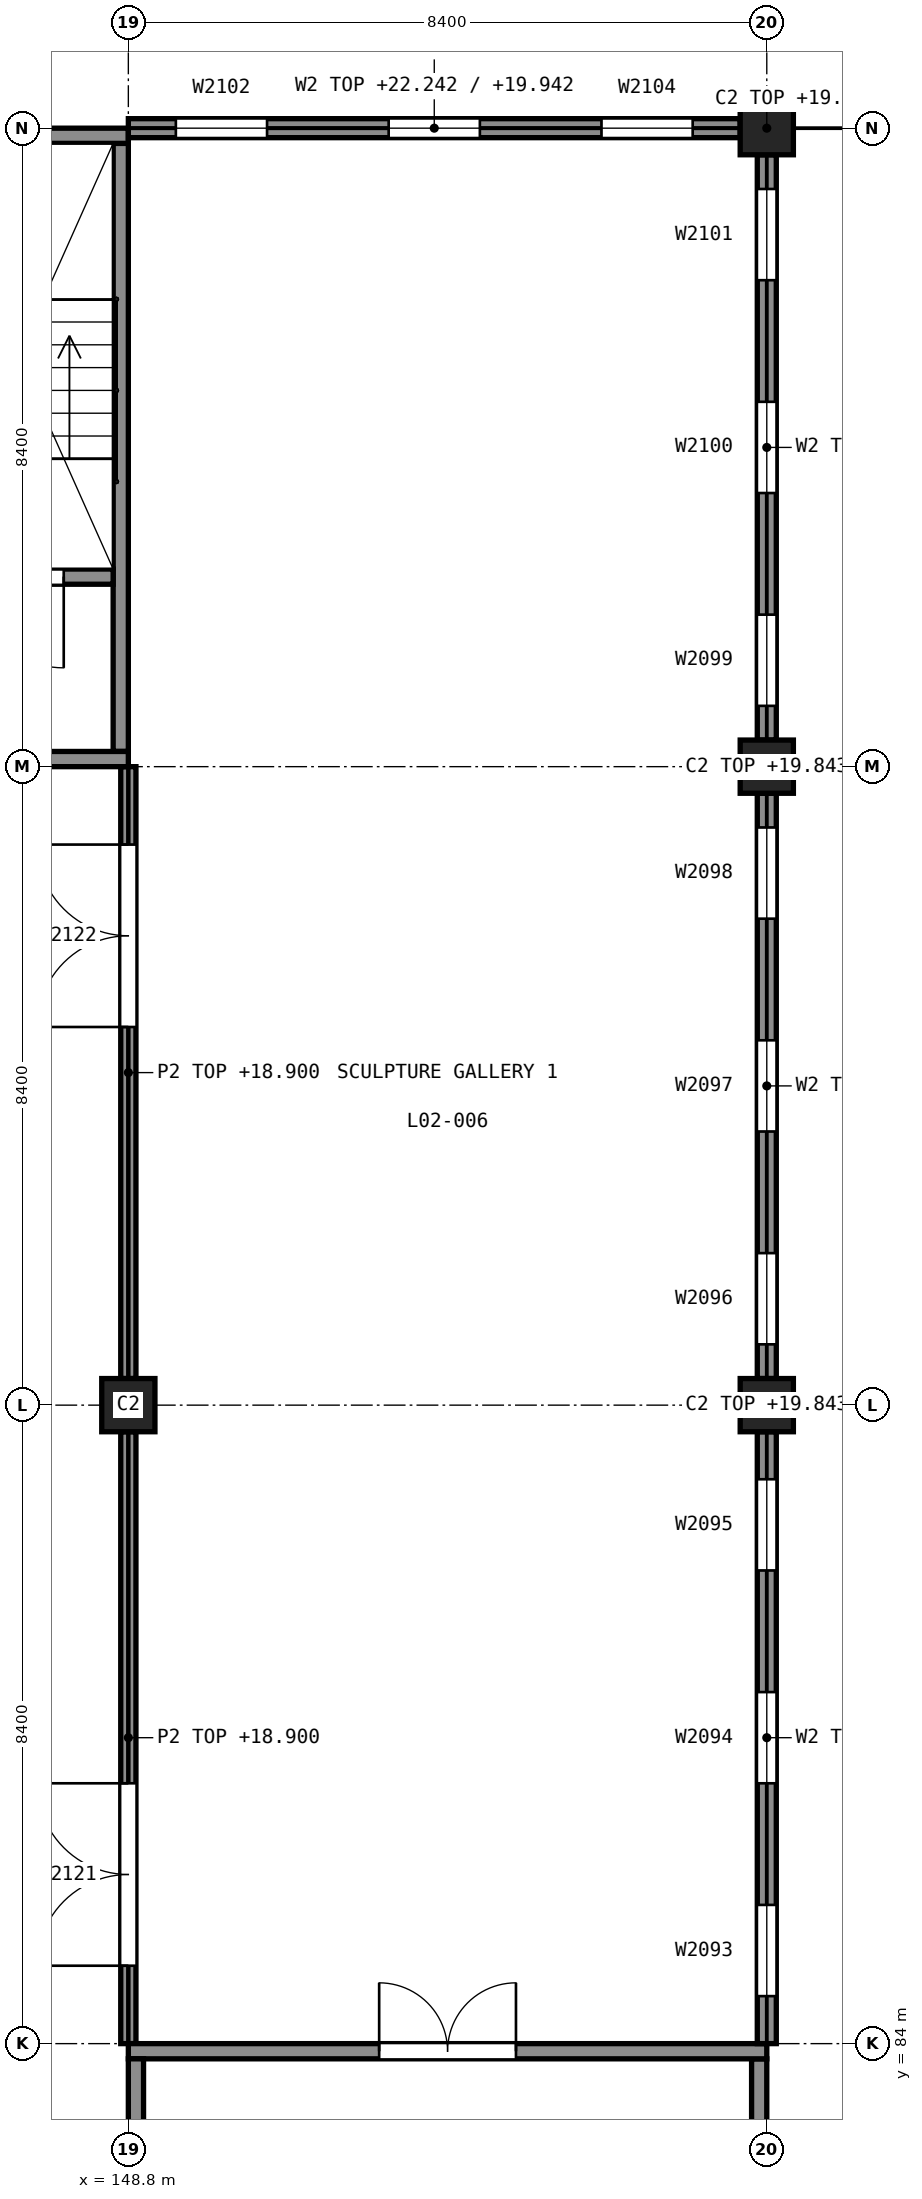
"""IFC4 building model, lengths in metres.
Left out: names, types, materials, properties, quantities, classifications, styles, units other than length and angle.
Written with IfcOpenShell. Run it as: python <this file> out.ifc"""

import sys

from ifc_helpers import new_model, si_unit, direction, frame, frame_2d, origin, origin_2d, place, context, subcontext, project, spatial, polyline, rectangle, outline, extrude, element, fill, save


model = new_model("IFC4")
c1 = context("Model", 3, precision=1e-05, world=origin(), true_north=direction((0.0, 1.0)))
c2 = subcontext(c1, "Body", "Model", "MODEL_VIEW")
j1 = project(units=[si_unit("LENGTHUNIT", "METRE"), si_unit("PLANEANGLEUNIT", "RADIAN")], contexts=[c1])
p1 = place(None, origin())
s1 = spatial("IfcSite", under=j1, at=p1, CompositionType="ELEMENT")
p2 = place(p1, origin())
s2 = spatial("IfcBuilding", under=s1, at=p2, CompositionType="ELEMENT")
p3 = place(p2, frame((0.0, 0.0, 10.5)))
s3 = spatial("IfcBuildingStorey", under=s2, at=p3, CompositionType="ELEMENT", Elevation=10.5)
p4 = place(p3, frame((140.4, 100.9, 0.0), z_axis=(0.0, 0.0, 1.0), x_axis=(1.0, 0.0, 0.0)))
e1 = element("IfcWall", 1, at=p4, inside=s3, PredefinedType="SHEAR", context=c2, shape_type="SweptSolid", body=[
    extrude(rectangle(XDim=8.4, YDim=0.2, at=frame_2d((4.2, 0.0))), origin(), (0.0, 0.0, 1.0), 9.5),
])
p5 = place(p4, frame((3.3, 0.0, 0.0)))
e2 = element("IfcOpeningElement", 2, at=p5, cuts=e1, PredefinedType="OPENING", context=c2, shape_type="SweptSolid", body=[
    extrude(rectangle(XDim=1.8, YDim=2.1, at=frame_2d((0.9, 1.05))), frame((0.0, 0.11, 0.0), z_axis=(0.0, -1.0, 0.0), x_axis=(1.0, 0.0, 0.0)), (0.0, 0.0, 1.0), 0.22),
])
p6 = place(p3, frame((140.4, 109.1, 0.0), z_axis=(0.0, 0.0, 1.0), x_axis=(1.0, 0.0, 0.0)))
e3 = element("IfcWall", 3, at=p6, inside=s3, PredefinedType="SHEAR", context=c2, shape_type="SweptSolid", body=[
    extrude(rectangle(XDim=8.4, YDim=0.2, at=frame_2d((4.2, 0.0))), origin(), (0.0, 0.0, 1.0), 9.5),
])
p7 = place(p3, frame((148.7, 101.0, 0.0), z_axis=(0.0, 0.0, 1.0), x_axis=(0.0, 1.0, 0.0)))
e4 = element("IfcWall", 4, at=p7, inside=s3, PredefinedType="SHEAR", context=c2, shape_type="SweptSolid", body=[
    extrude(rectangle(XDim=8.0, YDim=0.2, at=frame_2d((4.0, 0.0))), origin(), (0.0, 0.0, 1.0), 9.5),
])
p8 = place(p3, frame((140.6, 103.3, 0.0), z_axis=(0.0, 0.0, 1.0), x_axis=(1.0, 0.0, 0.0)))
e5 = element("IfcWall", 5, at=p8, inside=s3, PredefinedType="SHEAR", context=c2, shape_type="SweptSolid", body=[
    extrude(rectangle(XDim=8.0, YDim=0.2, at=frame_2d((4.0, 0.0))), origin(), (0.0, 0.0, 1.0), 9.5),
])
p9 = place(p8, frame((0.65, 0.0, 0.0)))
e6 = element("IfcOpeningElement", 6, at=p9, cuts=e5, PredefinedType="OPENING", context=c2, shape_type="SweptSolid", body=[
    extrude(rectangle(XDim=1.2, YDim=2.1, at=frame_2d((0.6, 1.05))), frame((0.0, 0.11, 0.0), z_axis=(0.0, -1.0, 0.0), x_axis=(1.0, 0.0, 0.0)), (0.0, 0.0, 1.0), 0.22),
])
p10 = place(p8, frame((6.15, 0.0, 0.0)))
e7 = element("IfcOpeningElement", 7, at=p10, cuts=e5, PredefinedType="OPENING", context=c2, shape_type="SweptSolid", body=[
    extrude(rectangle(XDim=1.2, YDim=2.1, at=frame_2d((0.6, 1.05))), frame((0.0, 0.11, 0.0), z_axis=(0.0, -1.0, 0.0), x_axis=(1.0, 0.0, 0.0)), (0.0, 0.0, 1.0), 0.22),
])
p11 = place(p3, frame((148.8, 83.9, 0.0), z_axis=(0.0, 0.0, 1.0), x_axis=(1.0, 0.0, 0.0)))
e8 = element("IfcWall", 8, at=p11, inside=s3, PredefinedType="SHEAR", context=c2, shape_type="SweptSolid", body=[
    extrude(outline(polyline([(0.0, 0.0), (8.4, 0.0), (8.4, 9.4), (8.1, 9.486), (7.8, 9.571), (6.9, 9.829), (6.6, 9.914), (6.0, 10.086), (5.7, 10.171), (4.8, 10.429), (4.5, 10.514), (3.9, 10.686), (3.6, 10.771), (2.7, 11.029), (2.4, 11.114), (1.8, 11.286), (1.5, 11.371), (0.6, 11.629), (0.3, 11.714), (0.0, 11.8), (0.0, 0.0)])), frame((0.0, 0.1, 0.0), z_axis=(0.0, -1.0, 0.0), x_axis=(1.0, 0.0, 0.0)), (0.0, 0.0, 1.0), 0.2),
])
p12 = place(p11, frame((3.3, 0.0, 0.0)))
e9 = element("IfcOpeningElement", 9, at=p12, cuts=e8, PredefinedType="OPENING", context=c2, shape_type="SweptSolid", body=[
    extrude(rectangle(XDim=1.8, YDim=2.1, at=frame_2d((0.9, 1.05))), frame((0.0, 0.11, 0.0), z_axis=(0.0, -1.0, 0.0), x_axis=(1.0, 0.0, 0.0)), (0.0, 0.0, 1.0), 0.22),
])
p13 = place(p3, frame((148.9, 75.8, 0.0), z_axis=(0.0, 0.0, 1.0), x_axis=(0.0, 1.0, 0.0)))
e10 = element("IfcWall", 10, at=p13, inside=s3, PredefinedType="SHEAR", context=c2, shape_type="SweptSolid", body=[
    extrude(rectangle(XDim=8.0, YDim=0.2, at=frame_2d((4.0, 0.0))), origin(), (0.0, 0.0, 1.0), 11.8),
])
p14 = place(p3, frame((157.1, 75.8, 0.0), z_axis=(0.0, 0.0, 1.0), x_axis=(0.0, 1.0, 0.0)))
e11 = element("IfcWall", 11, at=p14, inside=s3, PredefinedType="SHEAR", context=c2, shape_type="SweptSolid", body=[
    extrude(rectangle(XDim=8.0, YDim=0.2, at=frame_2d((4.0, 0.0))), origin(), (0.0, 0.0, 1.0), 9.43),
])
p15 = place(p3, frame((148.8, 92.4, 0.0), z_axis=(0.0, 0.0, 1.0), x_axis=(1.0, 0.0, 0.0)))
e12 = element("IfcColumn", 12, at=p15, inside=s3, PredefinedType="COLUMN", context=c2, shape_type="SweptSolid", body=[
    extrude(rectangle(XDim=0.7, YDim=0.7, at=origin_2d()), origin(), (0.0, 0.0, 1.0), 9.5),
])
for number, where, z_axis, x_axis in (
    (13, (157.2, 92.4, 0.0), (0.0, 0.0, 1.0), (1.0, 0.0, 0.0)),
    (14, (157.2, 100.8, 0.0), (0.0, 0.0, 1.0), (1.0, 0.0, 0.0)),
    (15, (157.2, 109.2, 0.0), (0.0, 0.0, 1.0), (1.0, 0.0, 0.0)),
):
    element("IfcColumn", number, at=place(p3, frame(where, z_axis=z_axis, x_axis=x_axis)), inside=s3, PredefinedType="COLUMN", context=c2, shape_type="SweptSolid", body=[
        extrude(rectangle(XDim=0.7, YDim=0.7, at=origin_2d()), origin(), (0.0, 0.0, 1.0), 9.343),
    ])
p16 = place(p3, frame((157.2, 84.0, 0.0), z_axis=(0.0, 0.0, 1.0), x_axis=(0.0, 1.0, 0.0)))
e16 = element("IfcWall", 16, at=p16, inside=s3, PredefinedType="SOLIDWALL", context=c2, shape_type="SweptSolid", body=[
    extrude(rectangle(XDim=8.05, YDim=0.25, at=frame_2d((4.025, 0.0))), origin(), (0.0, 0.0, 1.0), 9.342),
])
p17 = place(p16, frame((0.625, 0.0, 0.9)))
e17 = element("IfcOpeningElement", 17, at=p17, cuts=e16, PredefinedType="OPENING", context=c2, shape_type="SweptSolid", body=[
    extrude(rectangle(XDim=1.2, YDim=6.0, at=frame_2d((0.6, 3.0))), frame((0.0, 0.135, 0.0), z_axis=(0.0, -1.0, 0.0), x_axis=(1.0, 0.0, 0.0)), (0.0, 0.0, 1.0), 0.27),
])
p18 = place(p16, frame((3.425, 0.0, 0.9)))
e18 = element("IfcOpeningElement", 18, at=p18, cuts=e16, PredefinedType="OPENING", context=c2, shape_type="SweptSolid", body=[
    extrude(rectangle(XDim=1.2, YDim=6.0, at=frame_2d((0.6, 3.0))), frame((0.0, 0.135, 0.0), z_axis=(0.0, -1.0, 0.0), x_axis=(1.0, 0.0, 0.0)), (0.0, 0.0, 1.0), 0.27),
])
p19 = place(p16, frame((6.225, 0.0, 0.9)))
e19 = element("IfcOpeningElement", 19, at=p19, cuts=e16, PredefinedType="OPENING", context=c2, shape_type="SweptSolid", body=[
    extrude(rectangle(XDim=1.2, YDim=6.0, at=frame_2d((0.6, 3.0))), frame((0.0, 0.135, 0.0), z_axis=(0.0, -1.0, 0.0), x_axis=(1.0, 0.0, 0.0)), (0.0, 0.0, 1.0), 0.27),
])
p20 = place(p3, frame((157.2, 92.75, 0.0), z_axis=(0.0, 0.0, 1.0), x_axis=(0.0, 1.0, 0.0)))
e20 = element("IfcWall", 20, at=p20, inside=s3, PredefinedType="SOLIDWALL", context=c2, shape_type="SweptSolid", body=[
    extrude(rectangle(XDim=7.7, YDim=0.25, at=frame_2d((3.85, 0.0))), origin(), (0.0, 0.0, 1.0), 9.342),
])
p21 = place(p20, frame((0.45, 0.0, 0.9)))
e21 = element("IfcOpeningElement", 21, at=p21, cuts=e20, PredefinedType="OPENING", context=c2, shape_type="SweptSolid", body=[
    extrude(rectangle(XDim=1.2, YDim=6.0, at=frame_2d((0.6, 3.0))), frame((0.0, 0.135, 0.0), z_axis=(0.0, -1.0, 0.0), x_axis=(1.0, 0.0, 0.0)), (0.0, 0.0, 1.0), 0.27),
])
p22 = place(p20, frame((3.25, 0.0, 0.9)))
e22 = element("IfcOpeningElement", 22, at=p22, cuts=e20, PredefinedType="OPENING", context=c2, shape_type="SweptSolid", body=[
    extrude(rectangle(XDim=1.2, YDim=6.0, at=frame_2d((0.6, 3.0))), frame((0.0, 0.135, 0.0), z_axis=(0.0, -1.0, 0.0), x_axis=(1.0, 0.0, 0.0)), (0.0, 0.0, 1.0), 0.27),
])
p23 = place(p20, frame((6.05, 0.0, 0.9)))
e23 = element("IfcOpeningElement", 23, at=p23, cuts=e20, PredefinedType="OPENING", context=c2, shape_type="SweptSolid", body=[
    extrude(rectangle(XDim=1.2, YDim=6.0, at=frame_2d((0.6, 3.0))), frame((0.0, 0.135, 0.0), z_axis=(0.0, -1.0, 0.0), x_axis=(1.0, 0.0, 0.0)), (0.0, 0.0, 1.0), 0.27),
])
p24 = place(p3, frame((157.2, 101.15, 0.0), z_axis=(0.0, 0.0, 1.0), x_axis=(0.0, 1.0, 0.0)))
e24 = element("IfcWall", 24, at=p24, inside=s3, PredefinedType="SOLIDWALL", context=c2, shape_type="SweptSolid", body=[
    extrude(rectangle(XDim=7.7, YDim=0.25, at=frame_2d((3.85, 0.0))), origin(), (0.0, 0.0, 1.0), 9.342),
])
p25 = place(p24, frame((0.45, 0.0, 0.9)))
e25 = element("IfcOpeningElement", 25, at=p25, cuts=e24, PredefinedType="OPENING", context=c2, shape_type="SweptSolid", body=[
    extrude(rectangle(XDim=1.2, YDim=6.0, at=frame_2d((0.6, 3.0))), frame((0.0, 0.135, 0.0), z_axis=(0.0, -1.0, 0.0), x_axis=(1.0, 0.0, 0.0)), (0.0, 0.0, 1.0), 0.27),
])
p26 = place(p24, frame((3.25, 0.0, 0.9)))
e26 = element("IfcOpeningElement", 26, at=p26, cuts=e24, PredefinedType="OPENING", context=c2, shape_type="SweptSolid", body=[
    extrude(rectangle(XDim=1.2, YDim=6.0, at=frame_2d((0.6, 3.0))), frame((0.0, 0.135, 0.0), z_axis=(0.0, -1.0, 0.0), x_axis=(1.0, 0.0, 0.0)), (0.0, 0.0, 1.0), 0.27),
])
p27 = place(p24, frame((6.05, 0.0, 0.9)))
e27 = element("IfcOpeningElement", 27, at=p27, cuts=e24, PredefinedType="OPENING", context=c2, shape_type="SweptSolid", body=[
    extrude(rectangle(XDim=1.2, YDim=6.0, at=frame_2d((0.6, 3.0))), frame((0.0, 0.135, 0.0), z_axis=(0.0, -1.0, 0.0), x_axis=(1.0, 0.0, 0.0)), (0.0, 0.0, 1.0), 0.27),
])
p28 = place(p3, frame((148.8, 109.2, 0.0), z_axis=(0.0, 0.0, 1.0), x_axis=(1.0, 0.0, 0.0)))
e28 = element("IfcWall", 28, at=p28, inside=s3, PredefinedType="SOLIDWALL", context=c2, shape_type="SweptSolid", body=[
    extrude(outline(polyline([(0.0, 0.0), (8.05, 0.0), (8.05, 9.442), (0.0, 11.742), (0.0, 0.0)])), frame((0.0, 0.125, 0.0), z_axis=(0.0, -1.0, 0.0), x_axis=(1.0, 0.0, 0.0)), (0.0, 0.0, 1.0), 0.25),
])
p29 = place(p28, frame((0.625, 0.0, 0.9)))
e29 = element("IfcOpeningElement", 29, at=p29, cuts=e28, PredefinedType="OPENING", context=c2, shape_type="SweptSolid", body=[
    extrude(rectangle(XDim=1.2, YDim=6.0, at=frame_2d((0.6, 3.0))), frame((0.0, 0.135, 0.0), z_axis=(0.0, -1.0, 0.0), x_axis=(1.0, 0.0, 0.0)), (0.0, 0.0, 1.0), 0.27),
])
p30 = place(p28, frame((3.425, 0.0, 0.9)))
e30 = element("IfcOpeningElement", 30, at=p30, cuts=e28, PredefinedType="OPENING", context=c2, shape_type="SweptSolid", body=[
    extrude(rectangle(XDim=1.2, YDim=6.0, at=frame_2d((0.6, 3.0))), frame((0.0, 0.135, 0.0), z_axis=(0.0, -1.0, 0.0), x_axis=(1.0, 0.0, 0.0)), (0.0, 0.0, 1.0), 0.27),
])
p31 = place(p28, frame((6.225, 0.0, 0.9)))
e31 = element("IfcOpeningElement", 31, at=p31, cuts=e28, PredefinedType="OPENING", context=c2, shape_type="SweptSolid", body=[
    extrude(rectangle(XDim=1.2, YDim=6.0, at=frame_2d((0.6, 3.0))), frame((0.0, 0.135, 0.0), z_axis=(0.0, -1.0, 0.0), x_axis=(1.0, 0.0, 0.0)), (0.0, 0.0, 1.0), 0.27),
])
p32 = place(p3, frame((148.8, 84.0, 0.0), z_axis=(0.0, 0.0, 1.0), x_axis=(0.0, 1.0, 0.0)))
e32 = element("IfcWall", 32, at=p32, inside=s3, PredefinedType="PARTITIONING", context=c2, shape_type="SweptSolid", body=[
    extrude(rectangle(XDim=8.05, YDim=0.2, at=frame_2d((4.025, 0.0))), origin(), (0.0, 0.0, 1.0), 8.4),
])
p33 = place(p32, frame((1.025, 0.0, 0.0)))
e33 = element("IfcOpeningElement", 33, at=p33, cuts=e32, PredefinedType="OPENING", context=c2, shape_type="SweptSolid", body=[
    extrude(rectangle(XDim=2.4, YDim=2.4, at=frame_2d((1.2, 1.2))), frame((0.0, 0.11, 0.0), z_axis=(0.0, -1.0, 0.0), x_axis=(1.0, 0.0, 0.0)), (0.0, 0.0, 1.0), 0.22),
])
p34 = place(p3, frame((148.8, 92.75, 0.0), z_axis=(0.0, 0.0, 1.0), x_axis=(0.0, 1.0, 0.0)))
e34 = element("IfcWall", 34, at=p34, inside=s3, PredefinedType="PARTITIONING", context=c2, shape_type="SweptSolid", body=[
    extrude(rectangle(XDim=8.05, YDim=0.2, at=frame_2d((4.025, 0.0))), origin(), (0.0, 0.0, 1.0), 8.4),
])
p35 = place(p34, frame((4.625, 0.0, 0.0)))
e35 = element("IfcOpeningElement", 35, at=p35, cuts=e34, PredefinedType="OPENING", context=c2, shape_type="SweptSolid", body=[
    extrude(rectangle(XDim=2.4, YDim=2.4, at=frame_2d((1.2, 1.2))), frame((0.0, 0.11, 0.0), z_axis=(0.0, -1.0, 0.0), x_axis=(1.0, 0.0, 0.0)), (0.0, 0.0, 1.0), 0.22),
])
p36 = place(p17, origin())
e36 = element("IfcWindow", 36, at=p36, inside=s3, PartitioningType="SINGLE_PANEL", PredefinedType="WINDOW", context=c2, shape_type="SweptSolid", body=[
    extrude(rectangle(XDim=1.2, YDim=6.0, at=frame_2d((0.6, 3.0))), frame((0.0, 0.105, 0.0), z_axis=(0.0, -1.0, 0.0), x_axis=(1.0, 0.0, 0.0)), (0.0, 0.0, 1.0), 0.06),
])
fill(e17, e36)
p37 = place(p18, origin())
e37 = element("IfcWindow", 37, at=p37, inside=s3, PartitioningType="SINGLE_PANEL", PredefinedType="WINDOW", context=c2, shape_type="SweptSolid", body=[
    extrude(rectangle(XDim=1.2, YDim=6.0, at=frame_2d((0.6, 3.0))), frame((0.0, 0.105, 0.0), z_axis=(0.0, -1.0, 0.0), x_axis=(1.0, 0.0, 0.0)), (0.0, 0.0, 1.0), 0.06),
])
fill(e18, e37)
p38 = place(p19, origin())
e38 = element("IfcWindow", 38, at=p38, inside=s3, PartitioningType="SINGLE_PANEL", PredefinedType="WINDOW", context=c2, shape_type="SweptSolid", body=[
    extrude(rectangle(XDim=1.2, YDim=6.0, at=frame_2d((0.6, 3.0))), frame((0.0, 0.105, 0.0), z_axis=(0.0, -1.0, 0.0), x_axis=(1.0, 0.0, 0.0)), (0.0, 0.0, 1.0), 0.06),
])
fill(e19, e38)
p39 = place(p21, origin())
e39 = element("IfcWindow", 39, at=p39, inside=s3, PartitioningType="SINGLE_PANEL", PredefinedType="WINDOW", context=c2, shape_type="SweptSolid", body=[
    extrude(rectangle(XDim=1.2, YDim=6.0, at=frame_2d((0.6, 3.0))), frame((0.0, 0.105, 0.0), z_axis=(0.0, -1.0, 0.0), x_axis=(1.0, 0.0, 0.0)), (0.0, 0.0, 1.0), 0.06),
])
fill(e21, e39)
p40 = place(p22, origin())
e40 = element("IfcWindow", 40, at=p40, inside=s3, PartitioningType="SINGLE_PANEL", PredefinedType="WINDOW", context=c2, shape_type="SweptSolid", body=[
    extrude(rectangle(XDim=1.2, YDim=6.0, at=frame_2d((0.6, 3.0))), frame((0.0, 0.105, 0.0), z_axis=(0.0, -1.0, 0.0), x_axis=(1.0, 0.0, 0.0)), (0.0, 0.0, 1.0), 0.06),
])
fill(e22, e40)
p41 = place(p23, origin())
e41 = element("IfcWindow", 41, at=p41, inside=s3, PartitioningType="SINGLE_PANEL", PredefinedType="WINDOW", context=c2, shape_type="SweptSolid", body=[
    extrude(rectangle(XDim=1.2, YDim=6.0, at=frame_2d((0.6, 3.0))), frame((0.0, 0.105, 0.0), z_axis=(0.0, -1.0, 0.0), x_axis=(1.0, 0.0, 0.0)), (0.0, 0.0, 1.0), 0.06),
])
fill(e23, e41)
p42 = place(p25, origin())
e42 = element("IfcWindow", 42, at=p42, inside=s3, PartitioningType="SINGLE_PANEL", PredefinedType="WINDOW", context=c2, shape_type="SweptSolid", body=[
    extrude(rectangle(XDim=1.2, YDim=6.0, at=frame_2d((0.6, 3.0))), frame((0.0, 0.105, 0.0), z_axis=(0.0, -1.0, 0.0), x_axis=(1.0, 0.0, 0.0)), (0.0, 0.0, 1.0), 0.06),
])
fill(e25, e42)
p43 = place(p26, origin())
e43 = element("IfcWindow", 43, at=p43, inside=s3, PartitioningType="SINGLE_PANEL", PredefinedType="WINDOW", context=c2, shape_type="SweptSolid", body=[
    extrude(rectangle(XDim=1.2, YDim=6.0, at=frame_2d((0.6, 3.0))), frame((0.0, 0.105, 0.0), z_axis=(0.0, -1.0, 0.0), x_axis=(1.0, 0.0, 0.0)), (0.0, 0.0, 1.0), 0.06),
])
fill(e26, e43)
p44 = place(p27, origin())
e44 = element("IfcWindow", 44, at=p44, inside=s3, PartitioningType="SINGLE_PANEL", PredefinedType="WINDOW", context=c2, shape_type="SweptSolid", body=[
    extrude(rectangle(XDim=1.2, YDim=6.0, at=frame_2d((0.6, 3.0))), frame((0.0, 0.105, 0.0), z_axis=(0.0, -1.0, 0.0), x_axis=(1.0, 0.0, 0.0)), (0.0, 0.0, 1.0), 0.06),
])
fill(e27, e44)
p45 = place(p29, origin())
e45 = element("IfcWindow", 45, at=p45, inside=s3, PartitioningType="SINGLE_PANEL", PredefinedType="WINDOW", context=c2, shape_type="SweptSolid", body=[
    extrude(rectangle(XDim=1.2, YDim=6.0, at=frame_2d((0.6, 3.0))), frame((0.0, -0.045, 0.0), z_axis=(0.0, -1.0, 0.0), x_axis=(1.0, 0.0, 0.0)), (0.0, 0.0, 1.0), 0.06),
])
fill(e29, e45)
p46 = place(p30, origin())
e46 = element("IfcWindow", 46, at=p46, inside=s3, PartitioningType="SINGLE_PANEL", PredefinedType="WINDOW", context=c2, shape_type="SweptSolid", body=[
    extrude(rectangle(XDim=1.2, YDim=6.0, at=frame_2d((0.6, 3.0))), frame((0.0, -0.045, 0.0), z_axis=(0.0, -1.0, 0.0), x_axis=(1.0, 0.0, 0.0)), (0.0, 0.0, 1.0), 0.06),
])
fill(e30, e46)
p47 = place(p31, origin())
e47 = element("IfcWindow", 47, at=p47, inside=s3, PartitioningType="SINGLE_PANEL", PredefinedType="WINDOW", context=c2, shape_type="SweptSolid", body=[
    extrude(rectangle(XDim=1.2, YDim=6.0, at=frame_2d((0.6, 3.0))), frame((0.0, -0.045, 0.0), z_axis=(0.0, -1.0, 0.0), x_axis=(1.0, 0.0, 0.0)), (0.0, 0.0, 1.0), 0.06),
])
fill(e31, e47)
p48 = place(p33, origin())
e48 = element("IfcDoor", 48, at=p48, inside=s3, OperationType="DOUBLE_DOOR_SINGLE_SWING", PredefinedType="DOOR", context=c2, shape_type="SweptSolid", body=[
    extrude(rectangle(XDim=2.4, YDim=2.4, at=frame_2d((1.2, 1.2))), frame((0.0, 0.025, 0.0), z_axis=(0.0, -1.0, 0.0), x_axis=(1.0, 0.0, 0.0)), (0.0, 0.0, 1.0), 0.05),
])
fill(e33, e48)
p49 = place(p35, origin())
e49 = element("IfcDoor", 49, at=p49, inside=s3, OperationType="DOUBLE_DOOR_SINGLE_SWING", PredefinedType="DOOR", context=c2, shape_type="SweptSolid", body=[
    extrude(rectangle(XDim=2.4, YDim=2.4, at=frame_2d((1.2, 1.2))), frame((0.0, 0.025, 0.0), z_axis=(0.0, -1.0, 0.0), x_axis=(1.0, 0.0, 0.0)), (0.0, 0.0, 1.0), 0.05),
])
fill(e35, e49)
p50 = place(p10, origin())
e50 = element("IfcDoor", 50, at=p50, inside=s3, OperationType="SINGLE_SWING_RIGHT", PredefinedType="DOOR", context=c2, shape_type="SweptSolid", body=[
    extrude(rectangle(XDim=1.2, YDim=2.1, at=frame_2d((0.6, 1.05))), frame((0.0, 0.025, 0.0), z_axis=(0.0, -1.0, 0.0), x_axis=(1.0, 0.0, 0.0)), (0.0, 0.0, 1.0), 0.05),
])
fill(e7, e50)
p51 = place(p12, origin())
e51 = element("IfcDoor", 51, at=p51, inside=s3, OperationType="DOUBLE_DOOR_SINGLE_SWING", PredefinedType="DOOR", context=c2, shape_type="SweptSolid", body=[
    extrude(rectangle(XDim=1.8, YDim=2.1, at=frame_2d((0.9, 1.05))), frame((0.0, 0.025, 0.0), z_axis=(0.0, -1.0, 0.0), x_axis=(1.0, 0.0, 0.0)), (0.0, 0.0, 1.0), 0.05),
])
fill(e9, e51)
save(model, sys.argv[1])
